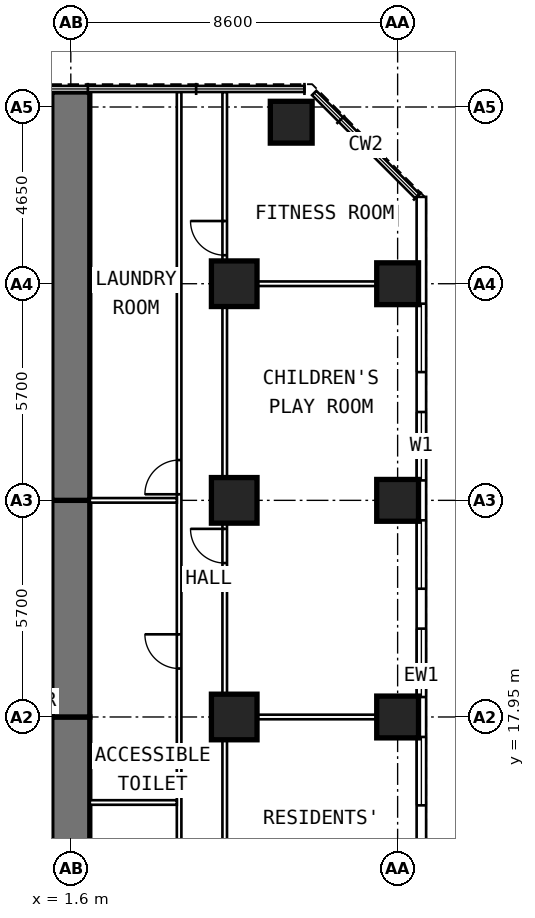
"""IFC4 building model, lengths in metres.
Left out: names, types, materials, properties, quantities, classifications, styles, units other than length and angle.
Written with IfcOpenShell. Run it as: python <this file> out.ifc"""

import sys

from ifc_helpers import new_model, si_unit, direction, frame, frame_2d, origin, origin_2d, place, context, subcontext, project, spatial, rectangle, extrude, element, fill, save


model = new_model("IFC4")
c1 = context("Model", 3, precision=1e-05, world=origin(), true_north=direction((0.0, 1.0)))
c2 = subcontext(c1, "Body", "Model", "MODEL_VIEW")
j1 = project(units=[si_unit("LENGTHUNIT", "METRE"), si_unit("PLANEANGLEUNIT", "RADIAN")], contexts=[c1])
p1 = place(None, origin())
s1 = spatial("IfcSite", under=j1, at=p1, CompositionType="ELEMENT")
p2 = place(p1, origin())
s2 = spatial("IfcBuilding", under=s1, at=p2, CompositionType="ELEMENT")
p3 = place(p2, frame((0.0, 0.0, 25.2)))
s3 = spatial("IfcBuildingStorey", under=s2, at=p3, CompositionType="ELEMENT", Elevation=25.2)
for number, where, z_axis, x_axis in (
    (1, (10.2, 17.95, 0.0), (0.0, 0.0, 1.0), (0.0, 1.0, 0.0)),
    (2, (10.2, 23.65, 0.0), (0.0, 0.0, 1.0), (0.0, 1.0, 0.0)),
    (3, (10.2, 29.35, 0.0), (0.0, 0.0, 1.0), (0.0, 1.0, 0.0)),
    (4, (7.4, 33.6, 0.0), (0.0, 0.0, 1.0), (0.0, 1.0, 0.0)),
):
    element("IfcColumn", number, at=place(p3, frame(where, z_axis=z_axis, x_axis=x_axis)), inside=s3, PredefinedType="COLUMN", context=c2, shape_type="SweptSolid", body=[
        extrude(rectangle(XDim=1.1, YDim=1.1, at=origin_2d()), origin(), (0.0, 0.0, 1.0), 3.6),
    ])
for number, where, z_axis, x_axis in (
    (5, (5.9, 17.95, 0.0), (0.0, 0.0, 1.0), (0.0, 1.0, 0.0)),
    (6, (5.9, 23.65, 0.0), (0.0, 0.0, 1.0), (0.0, 1.0, 0.0)),
    (7, (5.9, 29.35, 0.0), (0.0, 0.0, 1.0), (0.0, 1.0, 0.0)),
):
    element("IfcColumn", number, at=place(p3, frame(where, z_axis=z_axis, x_axis=x_axis)), inside=s3, PredefinedType="COLUMN", context=c2, shape_type="SweptSolid", body=[
        extrude(rectangle(XDim=1.2, YDim=1.2, at=origin_2d()), origin(), (0.0, 0.0, 1.0), 3.6),
    ])
p4 = place(p3, frame((1.6, 9.6, 0.0), z_axis=(0.0, 0.0, 1.0), x_axis=(0.0, 1.0, 0.0)))
e8 = element("IfcWall", 8, at=p4, inside=s3, PredefinedType="SHEAR", context=c2, shape_type="SweptSolid", body=[
    extrude(rectangle(XDim=8.35, YDim=1.0, at=frame_2d((4.175, 0.0))), origin(), (0.0, 0.0, 1.0), 3.6),
])
p5 = place(p4, frame((1.3, 0.0, 0.0)))
e9 = element("IfcOpeningElement", 9, at=p5, cuts=e8, PredefinedType="OPENING", context=c2, shape_type="SweptSolid", body=[
    extrude(rectangle(XDim=1.0, YDim=2.1, at=frame_2d((0.5, 1.05))), frame((0.0, 0.512, 0.0), z_axis=(0.0, -1.0, 0.0), x_axis=(1.0, 0.0, 0.0)), (0.0, 0.0, 1.0), 1.024),
])
p6 = place(p3, frame((1.6, 17.95, 0.0), z_axis=(0.0, 0.0, 1.0), x_axis=(0.0, 1.0, 0.0)))
e10 = element("IfcWall", 10, at=p6, inside=s3, PredefinedType="SHEAR", context=c2, shape_type="SweptSolid", body=[
    extrude(rectangle(XDim=5.7, YDim=1.0, at=frame_2d((2.85, 0.0))), origin(), (0.0, 0.0, 1.0), 3.6),
])
p7 = place(p3, frame((1.6, 23.65, 0.0), z_axis=(0.0, 0.0, 1.0), x_axis=(0.0, 1.0, 0.0)))
e11 = element("IfcWall", 11, at=p7, inside=s3, PredefinedType="SHEAR", context=c2, shape_type="SweptSolid", body=[
    extrude(rectangle(XDim=10.745, YDim=1.0, at=frame_2d((5.373, 0.0))), origin(), (0.0, 0.0, 1.0), 3.6),
])
p8 = place(p3, frame((10.825, 6.409, 0.0), z_axis=(0.0, 0.0, 1.0), x_axis=(0.0, 1.0, 0.0)))
e12 = element("IfcWall", 12, at=p8, inside=s3, PredefinedType="SOLIDWALL", context=c2, shape_type="SweptSolid", body=[
    extrude(rectangle(XDim=25.226, YDim=0.25, at=frame_2d((12.613, 0.0))), origin(), (0.0, 0.0, 1.0), 3.35),
])
p9 = place(p8, frame((0.666, 0.0, 0.8)))
e13 = element("IfcOpeningElement", 13, at=p9, cuts=e12, PredefinedType="OPENING", context=c2, shape_type="SweptSolid", body=[
    extrude(rectangle(XDim=1.8, YDim=1.8, at=frame_2d((0.9, 0.9))), frame((0.0, 0.137, 0.0), z_axis=(0.0, -1.0, 0.0), x_axis=(1.0, 0.0, 0.0)), (0.0, 0.0, 1.0), 0.274),
])
p10 = place(p8, frame((3.516, 0.0, 0.8)))
e14 = element("IfcOpeningElement", 14, at=p10, cuts=e12, PredefinedType="OPENING", context=c2, shape_type="SweptSolid", body=[
    extrude(rectangle(XDim=1.8, YDim=1.8, at=frame_2d((0.9, 0.9))), frame((0.0, 0.137, 0.0), z_axis=(0.0, -1.0, 0.0), x_axis=(1.0, 0.0, 0.0)), (0.0, 0.0, 1.0), 0.274),
])
p11 = place(p8, frame((6.366, 0.0, 0.8)))
e15 = element("IfcOpeningElement", 15, at=p11, cuts=e12, PredefinedType="OPENING", context=c2, shape_type="SweptSolid", body=[
    extrude(rectangle(XDim=1.8, YDim=1.8, at=frame_2d((0.9, 0.9))), frame((0.0, 0.137, 0.0), z_axis=(0.0, -1.0, 0.0), x_axis=(1.0, 0.0, 0.0)), (0.0, 0.0, 1.0), 0.274),
])
p12 = place(p8, frame((9.216, 0.0, 0.8)))
e16 = element("IfcOpeningElement", 16, at=p12, cuts=e12, PredefinedType="OPENING", context=c2, shape_type="SweptSolid", body=[
    extrude(rectangle(XDim=1.8, YDim=1.8, at=frame_2d((0.9, 0.9))), frame((0.0, 0.137, 0.0), z_axis=(0.0, -1.0, 0.0), x_axis=(1.0, 0.0, 0.0)), (0.0, 0.0, 1.0), 0.274),
])
p13 = place(p8, frame((12.066, 0.0, 0.8)))
e17 = element("IfcOpeningElement", 17, at=p13, cuts=e12, PredefinedType="OPENING", context=c2, shape_type="SweptSolid", body=[
    extrude(rectangle(XDim=1.8, YDim=1.8, at=frame_2d((0.9, 0.9))), frame((0.0, 0.137, 0.0), z_axis=(0.0, -1.0, 0.0), x_axis=(1.0, 0.0, 0.0)), (0.0, 0.0, 1.0), 0.274),
])
p14 = place(p8, frame((14.916, 0.0, 0.8)))
e18 = element("IfcOpeningElement", 18, at=p14, cuts=e12, PredefinedType="OPENING", context=c2, shape_type="SweptSolid", body=[
    extrude(rectangle(XDim=1.8, YDim=1.8, at=frame_2d((0.9, 0.9))), frame((0.0, 0.137, 0.0), z_axis=(0.0, -1.0, 0.0), x_axis=(1.0, 0.0, 0.0)), (0.0, 0.0, 1.0), 0.274),
])
p15 = place(p8, frame((17.766, 0.0, 0.8)))
e19 = element("IfcOpeningElement", 19, at=p15, cuts=e12, PredefinedType="OPENING", context=c2, shape_type="SweptSolid", body=[
    extrude(rectangle(XDim=1.8, YDim=1.8, at=frame_2d((0.9, 0.9))), frame((0.0, 0.137, 0.0), z_axis=(0.0, -1.0, 0.0), x_axis=(1.0, 0.0, 0.0)), (0.0, 0.0, 1.0), 0.274),
])
p16 = place(p8, frame((20.616, 0.0, 0.8)))
e20 = element("IfcOpeningElement", 20, at=p16, cuts=e12, PredefinedType="OPENING", context=c2, shape_type="SweptSolid", body=[
    extrude(rectangle(XDim=1.8, YDim=1.8, at=frame_2d((0.9, 0.9))), frame((0.0, 0.137, 0.0), z_axis=(0.0, -1.0, 0.0), x_axis=(1.0, 0.0, 0.0)), (0.0, 0.0, 1.0), 0.274),
])
p17 = place(p3, frame((4.45, 10.1, 0.0), z_axis=(0.0, 0.0, 1.0), x_axis=(0.0, 1.0, 0.0)))
e21 = element("IfcWall", 21, at=p17, inside=s3, PredefinedType="PARTITIONING", context=c2, shape_type="SweptSolid", body=[
    extrude(rectangle(XDim=24.295, YDim=0.12, at=frame_2d((12.147, 0.0))), origin(), (0.0, 0.0, 1.0), 3.35),
])
p18 = place(p17, frame((2.9, 0.0, 0.0)))
e22 = element("IfcOpeningElement", 22, at=p18, cuts=e21, PredefinedType="OPENING", context=c2, shape_type="SweptSolid", body=[
    extrude(rectangle(XDim=0.9, YDim=2.1, at=frame_2d((0.45, 1.05))), frame((0.0, 0.072, 0.0), z_axis=(0.0, -1.0, 0.0), x_axis=(1.0, 0.0, 0.0)), (0.0, 0.0, 1.0), 0.144),
])
p19 = place(p17, frame((9.125, 0.0, 0.0)))
e23 = element("IfcOpeningElement", 23, at=p19, cuts=e21, PredefinedType="OPENING", context=c2, shape_type="SweptSolid", body=[
    extrude(rectangle(XDim=0.9, YDim=2.1, at=frame_2d((0.45, 1.05))), frame((0.0, 0.072, 0.0), z_axis=(0.0, -1.0, 0.0), x_axis=(1.0, 0.0, 0.0)), (0.0, 0.0, 1.0), 0.144),
])
p20 = place(p17, frame((13.71, 0.0, 0.0)))
e24 = element("IfcOpeningElement", 24, at=p20, cuts=e21, PredefinedType="OPENING", context=c2, shape_type="SweptSolid", body=[
    extrude(rectangle(XDim=0.9, YDim=2.1, at=frame_2d((0.45, 1.05))), frame((0.0, 0.072, 0.0), z_axis=(0.0, -1.0, 0.0), x_axis=(1.0, 0.0, 0.0)), (0.0, 0.0, 1.0), 0.144),
])
p21 = place(p3, frame((5.65, 9.6, 0.0), z_axis=(0.0, 0.0, 1.0), x_axis=(0.0, 1.0, 0.0)))
e25 = element("IfcWall", 25, at=p21, inside=s3, PredefinedType="PARTITIONING", context=c2, shape_type="SweptSolid", body=[
    extrude(rectangle(XDim=24.795, YDim=0.12, at=frame_2d((12.397, 0.0))), origin(), (0.0, 0.0, 1.0), 3.35),
])
p22 = place(p21, frame((3.925, 0.0, 0.0)))
e26 = element("IfcOpeningElement", 26, at=p22, cuts=e25, PredefinedType="OPENING", context=c2, shape_type="SweptSolid", body=[
    extrude(rectangle(XDim=0.9, YDim=2.1, at=frame_2d((0.45, 1.05))), frame((0.0, 0.072, 0.0), z_axis=(0.0, -1.0, 0.0), x_axis=(1.0, 0.0, 0.0)), (0.0, 0.0, 1.0), 0.144),
])
p23 = place(p21, frame((12.4, 0.0, 0.0)))
e27 = element("IfcOpeningElement", 27, at=p23, cuts=e25, PredefinedType="OPENING", context=c2, shape_type="SweptSolid", body=[
    extrude(rectangle(XDim=0.9, YDim=2.1, at=frame_2d((0.45, 1.05))), frame((0.0, 0.072, 0.0), z_axis=(0.0, -1.0, 0.0), x_axis=(1.0, 0.0, 0.0)), (0.0, 0.0, 1.0), 0.144),
])
p24 = place(p21, frame((20.5, 0.0, 0.0)))
e28 = element("IfcOpeningElement", 28, at=p24, cuts=e25, PredefinedType="OPENING", context=c2, shape_type="SweptSolid", body=[
    extrude(rectangle(XDim=0.9, YDim=2.1, at=frame_2d((0.45, 1.05))), frame((0.0, 0.072, 0.0), z_axis=(0.0, -1.0, 0.0), x_axis=(1.0, 0.0, 0.0)), (0.0, 0.0, 1.0), 0.144),
])
for number, where, z_axis, x_axis in (
    (29, (5.71, 17.95, 0.0), (0.0, 0.0, 1.0), (1.0, 0.0, 0.0)),
    (30, (5.71, 29.35, 0.0), (0.0, 0.0, 1.0), (1.0, 0.0, 0.0)),
):
    element("IfcWall", number, at=place(p3, frame(where, z_axis=z_axis, x_axis=x_axis)), inside=s3, PredefinedType="PARTITIONING", context=c2, shape_type="SweptSolid", body=[
        extrude(rectangle(XDim=4.99, YDim=0.12, at=frame_2d((2.495, 0.0))), origin(), (0.0, 0.0, 1.0), 2.45),
    ])
p25 = place(p3, frame((2.1, 15.7, 0.0), z_axis=(0.0, 0.0, 1.0), x_axis=(1.0, 0.0, 0.0)))
e31 = element("IfcWall", 31, at=p25, inside=s3, PredefinedType="PARTITIONING", context=c2, shape_type="SweptSolid", body=[
    extrude(rectangle(XDim=2.29, YDim=0.12, at=frame_2d((1.145, 0.0))), origin(), (0.0, 0.0, 1.0), 3.35),
])
p26 = place(p3, frame((2.1, 23.65, 0.0), z_axis=(0.0, 0.0, 1.0), x_axis=(1.0, 0.0, 0.0)))
e32 = element("IfcWall", 32, at=p26, inside=s3, PredefinedType="PARTITIONING", context=c2, shape_type="SweptSolid", body=[
    extrude(rectangle(XDim=2.29, YDim=0.12, at=frame_2d((1.145, 0.0))), origin(), (0.0, 0.0, 1.0), 2.45),
])
p27 = place(p12, origin())
e33 = element("IfcWindow", 33, at=p27, inside=s3, PartitioningType="SINGLE_PANEL", PredefinedType="WINDOW", context=c2, shape_type="SweptSolid", body=[
    extrude(rectangle(XDim=1.8, YDim=1.8, at=frame_2d((0.9, 0.9))), frame((0.0, 0.03, 0.0), z_axis=(0.0, -1.0, 0.0), x_axis=(1.0, 0.0, 0.0)), (0.0, 0.0, 1.0), 0.06),
])
fill(e16, e33)
p28 = place(p13, origin())
e34 = element("IfcWindow", 34, at=p28, inside=s3, PartitioningType="SINGLE_PANEL", PredefinedType="WINDOW", context=c2, shape_type="SweptSolid", body=[
    extrude(rectangle(XDim=1.8, YDim=1.8, at=frame_2d((0.9, 0.9))), frame((0.0, 0.03, 0.0), z_axis=(0.0, -1.0, 0.0), x_axis=(1.0, 0.0, 0.0)), (0.0, 0.0, 1.0), 0.06),
])
fill(e17, e34)
p29 = place(p14, origin())
e35 = element("IfcWindow", 35, at=p29, inside=s3, PartitioningType="SINGLE_PANEL", PredefinedType="WINDOW", context=c2, shape_type="SweptSolid", body=[
    extrude(rectangle(XDim=1.8, YDim=1.8, at=frame_2d((0.9, 0.9))), frame((0.0, 0.03, 0.0), z_axis=(0.0, -1.0, 0.0), x_axis=(1.0, 0.0, 0.0)), (0.0, 0.0, 1.0), 0.06),
])
fill(e18, e35)
p30 = place(p15, origin())
e36 = element("IfcWindow", 36, at=p30, inside=s3, PartitioningType="SINGLE_PANEL", PredefinedType="WINDOW", context=c2, shape_type="SweptSolid", body=[
    extrude(rectangle(XDim=1.8, YDim=1.8, at=frame_2d((0.9, 0.9))), frame((0.0, 0.03, 0.0), z_axis=(0.0, -1.0, 0.0), x_axis=(1.0, 0.0, 0.0)), (0.0, 0.0, 1.0), 0.06),
])
fill(e19, e36)
p31 = place(p16, origin())
e37 = element("IfcWindow", 37, at=p31, inside=s3, PartitioningType="SINGLE_PANEL", PredefinedType="WINDOW", context=c2, shape_type="SweptSolid", body=[
    extrude(rectangle(XDim=1.8, YDim=1.8, at=frame_2d((0.9, 0.9))), frame((0.0, 0.03, 0.0), z_axis=(0.0, -1.0, 0.0), x_axis=(1.0, 0.0, 0.0)), (0.0, 0.0, 1.0), 0.06),
])
fill(e20, e37)
p32 = place(p23, origin())
e38 = element("IfcDoor", 38, at=p32, inside=s3, OperationType="SINGLE_SWING_RIGHT", PredefinedType="DOOR", context=c2, shape_type="SweptSolid", body=[
    extrude(rectangle(XDim=0.9, YDim=2.1, at=frame_2d((0.45, 1.05))), frame((0.0, 0.025, 0.0), z_axis=(0.0, -1.0, 0.0), x_axis=(1.0, 0.0, 0.0)), (0.0, 0.0, 1.0), 0.05),
])
fill(e27, e38)
p33 = place(p24, origin())
e39 = element("IfcDoor", 39, at=p33, inside=s3, OperationType="SINGLE_SWING_RIGHT", PredefinedType="DOOR", context=c2, shape_type="SweptSolid", body=[
    extrude(rectangle(XDim=0.9, YDim=2.1, at=frame_2d((0.45, 1.05))), frame((0.0, 0.025, 0.0), z_axis=(0.0, -1.0, 0.0), x_axis=(1.0, 0.0, 0.0)), (0.0, 0.0, 1.0), 0.05),
])
fill(e28, e39)
p34 = place(p19, origin())
e40 = element("IfcDoor", 40, at=p34, inside=s3, OperationType="SINGLE_SWING_RIGHT", PredefinedType="DOOR", context=c2, shape_type="SweptSolid", body=[
    extrude(rectangle(XDim=0.9, YDim=2.1, at=frame_2d((0.45, 1.05))), frame((0.0, 0.025, 0.0), z_axis=(0.0, -1.0, 0.0), x_axis=(1.0, 0.0, 0.0)), (0.0, 0.0, 1.0), 0.05),
])
fill(e23, e40)
p35 = place(p20, origin())
e41 = element("IfcDoor", 41, at=p35, inside=s3, OperationType="SINGLE_SWING_LEFT", PredefinedType="DOOR", context=c2, shape_type="SweptSolid", body=[
    extrude(rectangle(XDim=0.9, YDim=2.1, at=frame_2d((0.45, 1.05))), frame((0.0, 0.025, 0.0), z_axis=(0.0, -1.0, 0.0), x_axis=(1.0, 0.0, 0.0)), (0.0, 0.0, 1.0), 0.05),
])
fill(e24, e41)
save(model, sys.argv[1])
